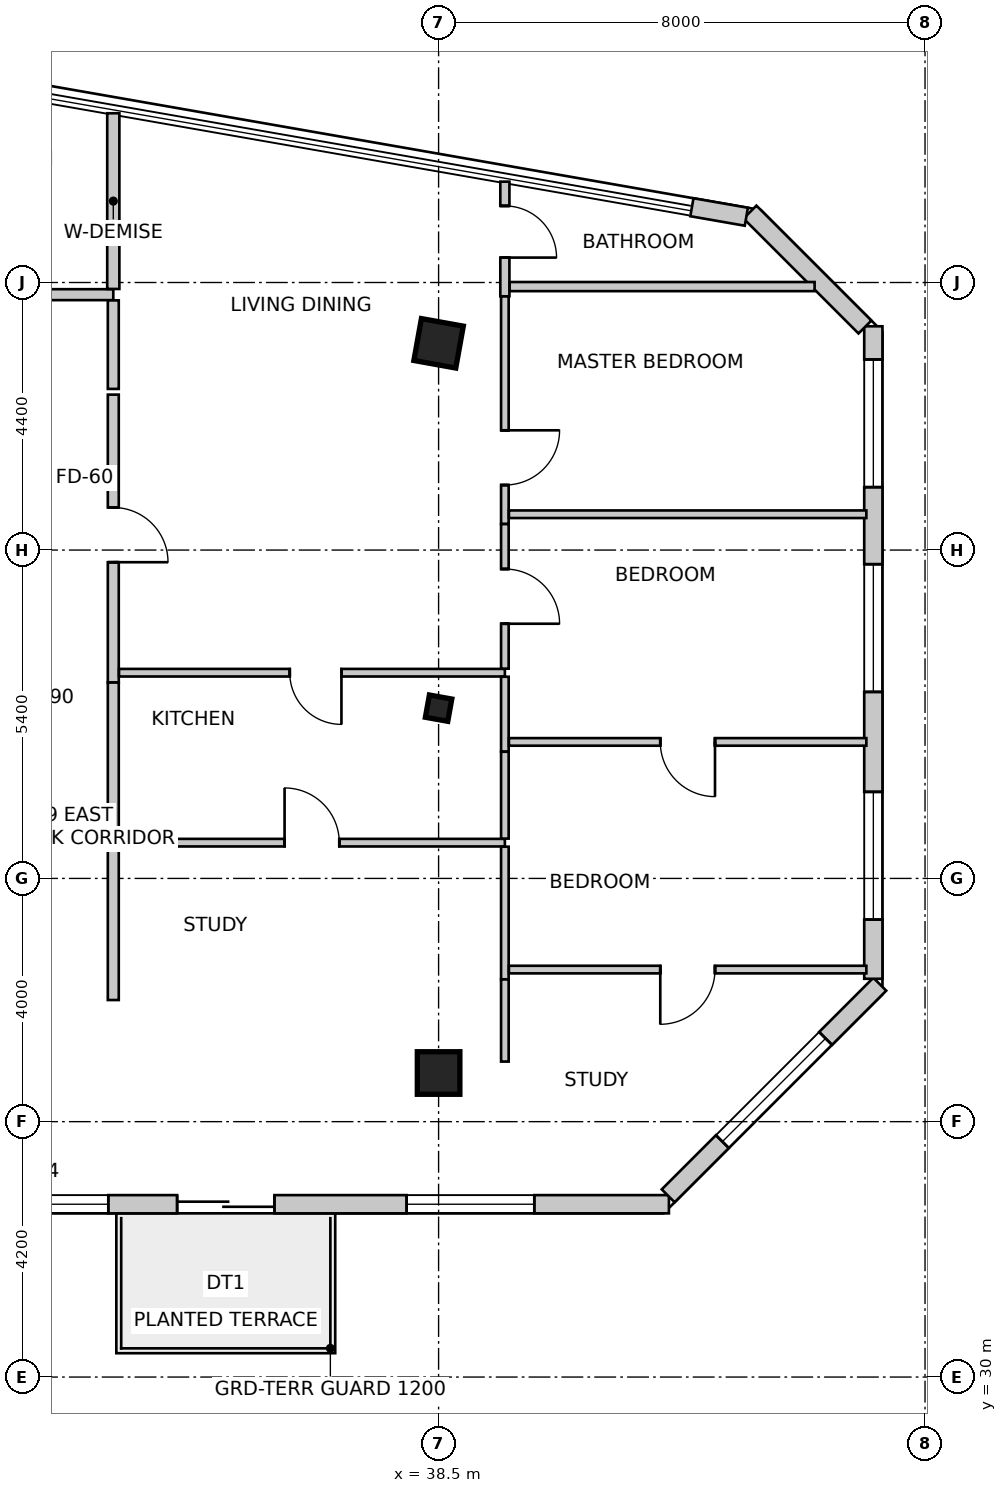
"""IFC4 building model, lengths in metres.
Left out: names, types, materials, properties, quantities, classifications, styles, units other than length and angle.
Written with IfcOpenShell. Run it as: python <this file> out.ifc"""

import sys

from ifc_helpers import new_model, si_unit, direction, frame, frame_2d, origin, origin_2d, place, context, subcontext, project, spatial, rectangle, i_section, extrude, source, transform, mapped, element, fill, save


model = new_model("IFC4")
c1 = context("Model", 3, precision=1e-05, world=origin(), true_north=direction((0.0, 1.0)))
c2 = subcontext(c1, "Body", "Model", "MODEL_VIEW")
j1 = project(units=[si_unit("LENGTHUNIT", "METRE"), si_unit("PLANEANGLEUNIT", "RADIAN")], contexts=[c1])
p1 = place(None, origin())
s1 = spatial("IfcSite", under=j1, at=p1, CompositionType="ELEMENT")
p2 = place(p1, origin())
s2 = spatial("IfcBuilding", under=s1, at=p2, CompositionType="ELEMENT")
p3 = place(p2, frame((0.0, 0.0, 232.4)))
s3 = spatial("IfcBuildingStorey", under=s2, at=p3, CompositionType="ELEMENT", Elevation=232.4)
m1 = source(origin(), c2, "Body", "SweptSolid", [
    extrude(rectangle(XDim=0.7, YDim=0.7, at=origin_2d()), origin(), (0.0, 0.0, 1.0), 3.5),
])
for number, where, z_axis, x_axis in (
    (1, (38.5, 47.0, 0.0), (0.0, 0.0, 1.0), (0.984, -0.177, 0.0)),
    (2, (38.5, 35.0, 0.0), (0.0, 0.0, 1.0), (1.0, 0.0, 0.0)),
):
    element("IfcColumn", number, at=place(p3, frame(where, z_axis=z_axis, x_axis=x_axis)), inside=s3, PredefinedType="COLUMN", context=c2, shape_type="MappedRepresentation", body=[
        mapped(m1, transform((0.0, 0.0, 0.0), scale=1.0)),
    ])
m2 = source(origin(), c2, "Body", "SweptSolid", [
    extrude(i_section(OverallWidth=0.374, OverallDepth=0.372, WebThickness=0.016, FlangeThickness=0.026, FilletRadius=0.015, at=origin_2d()), origin(), (0.0, 0.0, 1.0), 3.5),
])
p4 = place(p3, frame((38.5, 41.0, 0.0), z_axis=(0.0, 0.0, 1.0), x_axis=(0.984195607969, -0.17708474032, 0.0)))
e3 = element("IfcColumn", 3, at=p4, inside=s3, PredefinedType="COLUMN", context=c2, shape_type="MappedRepresentation", body=[
    mapped(m2, transform((0.0, 0.0, 0.0), scale=1.0)),
])
p5 = place(p3, frame((29.797, 32.842, 0.0), z_axis=(0.0, 0.0, 1.0), x_axis=(1.0, 0.0, 0.0)))
e4 = element("IfcWall", 4, at=p5, inside=s3, PredefinedType="SOLIDWALL", context=c2, shape_type="SweptSolid", body=[
    extrude(rectangle(XDim=12.491, YDim=0.3, at=frame_2d((6.245, 0.0))), origin(), (0.0, 0.0, 1.0), 3.25),
])
m3 = source(origin(), c2, "Body", "SweptSolid", [
    extrude(rectangle(XDim=1.6, YDim=2.15, at=frame_2d((0.8, 1.075))), frame((0.0, 0.16, 0.0), z_axis=(0.0, -1.0, 0.0), x_axis=(1.0, 0.0, 0.0)), (0.0, 0.0, 1.0), 0.32),
])
p6 = place(p5, frame((4.403, 0.0, 0.0)))
e5 = element("IfcOpeningElement", 5, at=p6, cuts=e4, PredefinedType="OPENING", context=c2, shape_type="MappedRepresentation", body=[
    mapped(m3, transform((0.0, 0.0, 0.0), scale=1.0)),
])
m4 = source(origin(), c2, "Body", "SweptSolid", [
    extrude(rectangle(XDim=2.1, YDim=2.0, at=frame_2d((1.05, 1.0))), frame((0.0, 0.16, 0.0), z_axis=(0.0, -1.0, 0.0), x_axis=(1.0, 0.0, 0.0)), (0.0, 0.0, 1.0), 0.32),
])
p7 = place(p5, frame((1.171, 0.0, 0.85)))
e6 = element("IfcOpeningElement", 6, at=p7, cuts=e4, PredefinedType="OPENING", context=c2, shape_type="MappedRepresentation", body=[
    mapped(m4, transform((0.0, 0.0, 0.0), scale=1.0)),
])
p8 = place(p5, frame((8.177, 0.0, 0.85)))
e7 = element("IfcOpeningElement", 7, at=p8, cuts=e4, PredefinedType="OPENING", context=c2, shape_type="MappedRepresentation", body=[
    mapped(m4, transform((0.0, 0.0, 0.0), scale=1.0)),
])
p9 = place(p3, frame((42.276, 32.98, 0.0), z_axis=(0.0, 0.0, 1.0), x_axis=(0.707106781187, 0.707106781187, 0.0)))
e8 = element("IfcWall", 8, at=p9, inside=s3, PredefinedType="SOLIDWALL", context=c2, shape_type="SweptSolid", body=[
    extrude(rectangle(XDim=4.922, YDim=0.3, at=frame_2d((2.461, 0.0))), origin(), (0.0, 0.0, 1.0), 3.25),
])
m5 = source(origin(), c2, "Body", "SweptSolid", [
    extrude(rectangle(XDim=2.4, YDim=2.2, at=frame_2d((1.2, 1.1))), frame((0.0, 0.16, 0.0), z_axis=(0.0, -1.0, 0.0), x_axis=(1.0, 0.0, 0.0)), (0.0, 0.0, 1.0), 0.32),
])
p10 = place(p9, frame((1.261, 0.0, 0.85)))
e9 = element("IfcOpeningElement", 9, at=p10, cuts=e8, PredefinedType="OPENING", context=c2, shape_type="MappedRepresentation", body=[
    mapped(m5, transform((0.0, 0.0, 0.0), scale=1.0)),
])
p11 = place(p3, frame((45.65, 36.549, 0.0), z_axis=(0.0, 0.0, 1.0), x_axis=(0.0, 1.0, 0.0)))
e10 = element("IfcWall", 10, at=p11, inside=s3, PredefinedType="SOLIDWALL", context=c2, shape_type="SweptSolid", body=[
    extrude(rectangle(XDim=10.73, YDim=0.3, at=frame_2d((5.365, 0.0))), origin(), (0.0, 0.0, 1.0), 3.25),
])
p12 = place(p11, frame((0.974, 0.0, 0.85)))
e11 = element("IfcOpeningElement", 11, at=p12, cuts=e10, PredefinedType="OPENING", context=c2, shape_type="MappedRepresentation", body=[
    mapped(m4, transform((0.0, 0.0, 0.0), scale=1.0)),
])
p13 = place(p11, frame((4.718, 0.0, 0.85)))
e12 = element("IfcOpeningElement", 12, at=p13, cuts=e10, PredefinedType="OPENING", context=c2, shape_type="MappedRepresentation", body=[
    mapped(m4, transform((0.0, 0.0, 0.0), scale=1.0)),
])
p14 = place(p11, frame((8.085, 0.0, 0.85)))
e13 = element("IfcOpeningElement", 13, at=p14, cuts=e10, PredefinedType="OPENING", context=c2, shape_type="MappedRepresentation", body=[
    mapped(m4, transform((0.0, 0.0, 0.0), scale=1.0)),
])
p15 = place(p3, frame((45.512, 47.268, 0.0), z_axis=(0.0, 0.0, 1.0), x_axis=(-0.707106781187, 0.707106781187, 0.0)))
e14 = element("IfcWall", 14, at=p15, inside=s3, PredefinedType="SOLIDWALL", context=c2, shape_type="SweptSolid", body=[
    extrude(rectangle(XDim=2.674, YDim=0.3, at=frame_2d((1.337, 0.0))), origin(), (0.0, 0.0, 1.0), 3.25),
])
p16 = place(p3, frame((43.561, 49.081, 0.0), z_axis=(0.0, 0.0, 1.0), x_axis=(-0.985063518612, 0.172191359539, 0.0)))
e15 = element("IfcWall", 15, at=p16, inside=s3, PredefinedType="SOLIDWALL", context=c2, shape_type="SweptSolid", body=[
    extrude(rectangle(XDim=0.909, YDim=0.3, at=frame_2d((0.455, 0.0))), origin(), (0.0, 0.0, 1.0), 3.25),
])
p17 = place(p3, frame((28.362, 47.8, 0.0), z_axis=(0.0, 0.0, 1.0), x_axis=(1.0, 0.0, 0.0)))
e16 = element("IfcWall", 16, at=p17, inside=s3, PredefinedType="PARTITIONING", context=c2, shape_type="SweptSolid", body=[
    extrude(rectangle(XDim=4.788, YDim=0.18, at=frame_2d((2.394, 0.0))), origin(), (0.0, 0.0, 1.0), 2.822),
])
m6 = source(origin(), c2, "Body", "SweptSolid", [
    extrude(rectangle(XDim=0.85, YDim=2.15, at=frame_2d((0.425, 1.075))), frame((0.0, 0.1, 0.0), z_axis=(0.0, -1.0, 0.0), x_axis=(1.0, 0.0, 0.0)), (0.0, 0.0, 1.0), 0.2),
])
p18 = place(p17, frame((0.401, 0.0, 0.0)))
e17 = element("IfcOpeningElement", 17, at=p18, cuts=e16, PredefinedType="OPENING", context=c2, shape_type="MappedRepresentation", body=[
    mapped(m6, transform((0.0, 0.0, 0.0), scale=1.0)),
])
p19 = place(p3, frame((33.15, 47.706, 0.0), z_axis=(0.0, 0.0, 1.0), x_axis=(0.0, -1.0, 0.0)))
e18 = element("IfcWall", 18, at=p19, inside=s3, PredefinedType="PARTITIONING", context=c2, shape_type="SweptSolid", body=[
    extrude(rectangle(XDim=1.456, YDim=0.18, at=frame_2d((0.728, 0.0))), origin(), (0.0, 0.0, 1.0), 2.934),
])
p20 = place(p3, frame((33.15, 38.948, 0.0), z_axis=(0.0, 0.0, 1.0), x_axis=(0.0, -1.0, 0.0)))
e19 = element("IfcWall", 19, at=p20, inside=s3, PredefinedType="PARTITIONING", context=c2, shape_type="SweptSolid", body=[
    extrude(rectangle(XDim=2.748, YDim=0.18, at=frame_2d((1.374, 0.0))), origin(), (0.0, 0.0, 1.0), 3.25),
])
p21 = place(p3, frame((33.15, 46.156, 0.0), z_axis=(0.0, 0.0, 1.0), x_axis=(0.0, -1.0, 0.0)))
e20 = element("IfcWall", 20, at=p21, inside=s3, PredefinedType="PARTITIONING", context=c2, shape_type="SweptSolid", body=[
    extrude(rectangle(XDim=4.733, YDim=0.18, at=frame_2d((2.366, 0.0))), origin(), (0.0, 0.0, 1.0), 2.822),
])
m7 = source(origin(), c2, "Body", "SweptSolid", [
    extrude(rectangle(XDim=0.9, YDim=2.15, at=frame_2d((0.45, 1.075))), frame((0.0, 0.1, 0.0), z_axis=(0.0, -1.0, 0.0), x_axis=(1.0, 0.0, 0.0)), (0.0, 0.0, 1.0), 0.2),
])
p22 = place(p21, frame((1.856, 0.0, 0.0)))
e21 = element("IfcOpeningElement", 21, at=p22, cuts=e20, PredefinedType="OPENING", context=c2, shape_type="MappedRepresentation", body=[
    mapped(m7, transform((0.0, 0.0, 0.0), scale=1.0)),
])
p23 = place(p3, frame((33.15, 41.421, 0.0), z_axis=(0.0, 0.0, 1.0), x_axis=(0.0, -1.0, 0.0)))
e22 = element("IfcWall", 22, at=p23, inside=s3, PredefinedType="PARTITIONING", context=c2, shape_type="SweptSolid", body=[
    extrude(rectangle(XDim=2.471, YDim=0.18, at=frame_2d((1.235, 0.0))), origin(), (0.0, 0.0, 1.0), 3.25),
])
p24 = place(p3, frame((33.15, 50.783, 0.0), z_axis=(0.0, 0.0, 1.0), x_axis=(0.0, -1.0, 0.0)))
e23 = element("IfcWall", 23, at=p24, inside=s3, PredefinedType="PARTITIONING", context=c2, shape_type="SweptSolid", body=[
    extrude(rectangle(XDim=2.889, YDim=0.2, at=frame_2d((1.445, 0.0))), origin(), (0.0, 0.0, 1.0), 2.542),
])
p25 = place(p3, frame((33.244, 38.788, 0.0), z_axis=(0.0, 0.0, 1.0), x_axis=(1.0, 0.0, 0.0)))
e24 = element("IfcWall", 24, at=p25, inside=s3, PredefinedType="PARTITIONING", context=c2, shape_type="SweptSolid", body=[
    extrude(rectangle(XDim=6.346, YDim=0.125, at=frame_2d((3.173, 0.0))), origin(), (0.0, 0.0, 1.0), 2.766),
])
m8 = source(origin(), c2, "Body", "SweptSolid", [
    extrude(rectangle(XDim=0.9, YDim=2.15, at=frame_2d((0.45, 1.075))), frame((0.0, 0.073, 0.0), z_axis=(0.0, -1.0, 0.0), x_axis=(1.0, 0.0, 0.0)), (0.0, 0.0, 1.0), 0.145),
])
p26 = place(p25, frame((2.723, 0.0, 0.0)))
e25 = element("IfcOpeningElement", 25, at=p26, cuts=e24, PredefinedType="OPENING", context=c2, shape_type="MappedRepresentation", body=[
    mapped(m8, transform((0.0, 0.0, 0.0), scale=1.0)),
])
p27 = place(p3, frame((39.59, 38.721, 0.0), z_axis=(0.0, 0.0, 1.0), x_axis=(0.0, -1.0, 0.0)))
e26 = element("IfcWall", 26, at=p27, inside=s3, PredefinedType="PARTITIONING", context=c2, shape_type="SweptSolid", body=[
    extrude(rectangle(XDim=2.18, YDim=0.125, at=frame_2d((1.09, 0.0))), origin(), (0.0, 0.0, 1.0), 3.25),
])
p28 = place(p3, frame((39.59, 36.539, 0.0), z_axis=(0.0, 0.0, 1.0), x_axis=(0.0, -1.0, 0.0)))
e27 = element("IfcWall", 27, at=p28, inside=s3, PredefinedType="PARTITIONING", context=c2, shape_type="SweptSolid", body=[
    extrude(rectangle(XDim=1.351, YDim=0.125, at=frame_2d((0.676, 0.0))), origin(), (0.0, 0.0, 1.0), 3.25),
])
p29 = place(p3, frame((39.59, 41.583, 0.0), z_axis=(0.0, 0.0, 1.0), x_axis=(-1.0, 0.0, 0.0)))
e28 = element("IfcWall", 28, at=p29, inside=s3, PredefinedType="PARTITIONING", context=c2, shape_type="SweptSolid", body=[
    extrude(rectangle(XDim=6.346, YDim=0.125, at=frame_2d((3.173, 0.0))), origin(), (0.0, 0.0, 1.0), 2.766),
])
m9 = source(origin(), c2, "Body", "SweptSolid", [
    extrude(rectangle(XDim=0.85, YDim=2.15, at=frame_2d((0.425, 1.075))), frame((0.0, 0.073, 0.0), z_axis=(0.0, -1.0, 0.0), x_axis=(1.0, 0.0, 0.0)), (0.0, 0.0, 1.0), 0.145),
])
p30 = place(p29, frame((2.688, 0.0, 0.0)))
e29 = element("IfcOpeningElement", 29, at=p30, cuts=e28, PredefinedType="OPENING", context=c2, shape_type="MappedRepresentation", body=[
    mapped(m9, transform((0.0, 0.0, 0.0), scale=1.0)),
])
p31 = place(p3, frame((39.59, 49.658, 0.0), z_axis=(0.0, 0.0, 1.0), x_axis=(0.0, -1.0, 0.0)))
e30 = element("IfcWall", 30, at=p31, inside=s3, PredefinedType="PARTITIONING", context=c2, shape_type="SweptSolid", body=[
    extrude(rectangle(XDim=1.885, YDim=0.15, at=frame_2d((0.943, 0.0))), origin(), (0.0, 0.0, 1.0), 3.25),
])
m10 = source(origin(), c2, "Body", "SweptSolid", [
    extrude(rectangle(XDim=0.85, YDim=2.15, at=frame_2d((0.425, 1.075))), frame((0.0, 0.085, 0.0), z_axis=(0.0, -1.0, 0.0), x_axis=(1.0, 0.0, 0.0)), (0.0, 0.0, 1.0), 0.17),
])
p32 = place(p31, frame((0.399, 0.0, 0.0)))
e31 = element("IfcOpeningElement", 31, at=p32, cuts=e30, PredefinedType="OPENING", context=c2, shape_type="MappedRepresentation", body=[
    mapped(m10, transform((0.0, 0.0, 0.0), scale=1.0)),
])
p33 = place(p3, frame((39.59, 47.771, 0.0), z_axis=(0.0, 0.0, 1.0), x_axis=(0.0, -1.0, 0.0)))
e32 = element("IfcWall", 32, at=p33, inside=s3, PredefinedType="PARTITIONING", context=c2, shape_type="SweptSolid", body=[
    extrude(rectangle(XDim=3.742, YDim=0.125, at=frame_2d((1.871, 0.0))), origin(), (0.0, 0.0, 1.0), 3.25),
])
p34 = place(p33, frame((2.202, 0.0, 0.0)))
e33 = element("IfcOpeningElement", 33, at=p34, cuts=e32, PredefinedType="OPENING", context=c2, shape_type="MappedRepresentation", body=[
    mapped(m8, transform((0.0, 0.0, 0.0), scale=1.0)),
])
p35 = place(p3, frame((39.59, 44.027, 0.0), z_axis=(0.0, 0.0, 1.0), x_axis=(0.0, -1.0, 0.0)))
e34 = element("IfcWall", 34, at=p35, inside=s3, PredefinedType="PARTITIONING", context=c2, shape_type="SweptSolid", body=[
    extrude(rectangle(XDim=2.378, YDim=0.125, at=frame_2d((1.189, 0.0))), origin(), (0.0, 0.0, 1.0), 3.25),
])
p36 = place(p35, frame((0.739, 0.0, 0.0)))
e35 = element("IfcOpeningElement", 35, at=p36, cuts=e34, PredefinedType="OPENING", context=c2, shape_type="MappedRepresentation", body=[
    mapped(m8, transform((0.0, 0.0, 0.0), scale=1.0)),
])
p37 = place(p3, frame((39.59, 41.517, 0.0), z_axis=(0.0, 0.0, 1.0), x_axis=(0.0, -1.0, 0.0)))
e36 = element("IfcWall", 36, at=p37, inside=s3, PredefinedType="PARTITIONING", context=c2, shape_type="SweptSolid", body=[
    extrude(rectangle(XDim=1.232, YDim=0.125, at=frame_2d((0.616, 0.0))), origin(), (0.0, 0.0, 1.0), 3.25),
])
p38 = place(p3, frame((39.59, 40.283, 0.0), z_axis=(0.0, 0.0, 1.0), x_axis=(0.0, -1.0, 0.0)))
e37 = element("IfcWall", 37, at=p38, inside=s3, PredefinedType="PARTITIONING", context=c2, shape_type="SweptSolid", body=[
    extrude(rectangle(XDim=1.428, YDim=0.125, at=frame_2d((0.714, 0.0))), origin(), (0.0, 0.0, 1.0), 3.25),
])
p39 = place(p3, frame((44.684, 47.933, 0.0), z_axis=(0.0, 0.0, 1.0), x_axis=(-1.0, 0.0, 0.0)))
e38 = element("IfcWall", 38, at=p39, inside=s3, PredefinedType="PARTITIONING", context=c2, shape_type="SweptSolid", body=[
    extrude(rectangle(XDim=5.015, YDim=0.15, at=frame_2d((2.508, 0.0))), origin(), (0.0, 0.0, 1.0), 3.25),
])
p40 = place(p3, frame((45.535, 44.189, 0.0), z_axis=(0.0, 0.0, 1.0), x_axis=(-1.0, 0.0, 0.0)))
e39 = element("IfcWall", 39, at=p40, inside=s3, PredefinedType="PARTITIONING", context=c2, shape_type="SweptSolid", body=[
    extrude(rectangle(XDim=5.878, YDim=0.125, at=frame_2d((2.939, 0.0))), origin(), (0.0, 0.0, 1.0), 3.25),
])
p41 = place(p3, frame((45.535, 40.445, 0.0), z_axis=(0.0, 0.0, 1.0), x_axis=(-1.0, 0.0, 0.0)))
e40 = element("IfcWall", 40, at=p41, inside=s3, PredefinedType="PARTITIONING", context=c2, shape_type="SweptSolid", body=[
    extrude(rectangle(XDim=5.878, YDim=0.125, at=frame_2d((2.939, 0.0))), origin(), (0.0, 0.0, 1.0), 3.25),
])
p42 = place(p41, frame((2.489, 0.0, 0.0)))
e41 = element("IfcOpeningElement", 41, at=p42, cuts=e40, PredefinedType="OPENING", context=c2, shape_type="MappedRepresentation", body=[
    mapped(m8, transform((0.0, 0.0, 0.0), scale=1.0)),
])
p43 = place(p3, frame((45.535, 36.701, 0.0), z_axis=(0.0, 0.0, 1.0), x_axis=(-1.0, 0.0, 0.0)))
e42 = element("IfcWall", 42, at=p43, inside=s3, PredefinedType="PARTITIONING", context=c2, shape_type="SweptSolid", body=[
    extrude(rectangle(XDim=5.878, YDim=0.125, at=frame_2d((2.939, 0.0))), origin(), (0.0, 0.0, 1.0), 3.25),
])
p44 = place(p43, frame((2.489, 0.0, 0.0)))
e43 = element("IfcOpeningElement", 43, at=p44, cuts=e42, PredefinedType="OPENING", context=c2, shape_type="MappedRepresentation", body=[
    mapped(m8, transform((0.0, 0.0, 0.0), scale=1.0)),
])
m11 = source(origin(), c2, "Body", "SweptSolid", [
    extrude(rectangle(XDim=1.6, YDim=2.15, at=frame_2d((0.8, 1.075))), frame((0.0, 0.025, 0.0), z_axis=(0.0, -1.0, 0.0), x_axis=(1.0, 0.0, 0.0)), (0.0, 0.0, 1.0), 0.05),
])
p45 = place(p6, origin())
e44 = element("IfcDoor", 44, at=p45, inside=s3, OperationType="DOUBLE_DOOR_SLIDING", PredefinedType="DOOR", context=c2, shape_type="MappedRepresentation", body=[
    mapped(m11, transform((0.0, 0.0, 0.0), scale=1.0)),
])
fill(e5, e44)
m12 = source(origin(), c2, "Body", "SweptSolid", [
    extrude(rectangle(XDim=2.1, YDim=2.0, at=frame_2d((1.05, 1.0))), frame((0.0, -0.015, 0.0), z_axis=(0.0, -1.0, 0.0), x_axis=(1.0, 0.0, 0.0)), (0.0, 0.0, 1.0), 0.06),
])
p46 = place(p7, origin())
e45 = element("IfcWindow", 45, at=p46, inside=s3, PartitioningType="SINGLE_PANEL", PredefinedType="WINDOW", context=c2, shape_type="MappedRepresentation", body=[
    mapped(m12, transform((0.0, 0.0, 0.0), scale=1.0)),
])
fill(e6, e45)
p47 = place(p8, origin())
e46 = element("IfcWindow", 46, at=p47, inside=s3, PartitioningType="SINGLE_PANEL", PredefinedType="WINDOW", context=c2, shape_type="MappedRepresentation", body=[
    mapped(m12, transform((0.0, 0.0, 0.0), scale=1.0)),
])
fill(e7, e46)
m13 = source(origin(), c2, "Body", "SweptSolid", [
    extrude(rectangle(XDim=2.4, YDim=2.2, at=frame_2d((1.2, 1.1))), frame((0.0, -0.015, 0.0), z_axis=(0.0, -1.0, 0.0), x_axis=(1.0, 0.0, 0.0)), (0.0, 0.0, 1.0), 0.06),
])
p48 = place(p10, origin())
e47 = element("IfcWindow", 47, at=p48, inside=s3, PartitioningType="SINGLE_PANEL", PredefinedType="WINDOW", context=c2, shape_type="MappedRepresentation", body=[
    mapped(m13, transform((0.0, 0.0, 0.0), scale=1.0)),
])
fill(e9, e47)
p49 = place(p12, origin())
e48 = element("IfcWindow", 48, at=p49, inside=s3, PartitioningType="SINGLE_PANEL", PredefinedType="WINDOW", context=c2, shape_type="MappedRepresentation", body=[
    mapped(m12, transform((0.0, 0.0, 0.0), scale=1.0)),
])
fill(e11, e48)
p50 = place(p13, origin())
e49 = element("IfcWindow", 49, at=p50, inside=s3, PartitioningType="SINGLE_PANEL", PredefinedType="WINDOW", context=c2, shape_type="MappedRepresentation", body=[
    mapped(m12, transform((0.0, 0.0, 0.0), scale=1.0)),
])
fill(e12, e49)
p51 = place(p14, origin())
e50 = element("IfcWindow", 50, at=p51, inside=s3, PartitioningType="SINGLE_PANEL", PredefinedType="WINDOW", context=c2, shape_type="MappedRepresentation", body=[
    mapped(m12, transform((0.0, 0.0, 0.0), scale=1.0)),
])
fill(e13, e50)
m14 = source(origin(), c2, "Body", "SweptSolid", [
    extrude(rectangle(XDim=0.9, YDim=2.15, at=frame_2d((0.45, 1.075))), frame((0.0, 0.025, 0.0), z_axis=(0.0, -1.0, 0.0), x_axis=(1.0, 0.0, 0.0)), (0.0, 0.0, 1.0), 0.05),
])
p52 = place(p26, origin())
e51 = element("IfcDoor", 51, at=p52, inside=s3, OperationType="SINGLE_SWING_LEFT", PredefinedType="DOOR", context=c2, shape_type="MappedRepresentation", body=[
    mapped(m14, transform((0.0, 0.0, 0.0), scale=1.0)),
])
fill(e25, e51)
m15 = source(origin(), c2, "Body", "SweptSolid", [
    extrude(rectangle(XDim=0.9, YDim=2.15, at=frame_2d((0.45, 1.075))), frame((0.0, 0.025, 0.0), z_axis=(0.0, -1.0, 0.0), x_axis=(1.0, 0.0, 0.0)), (0.0, 0.0, 1.0), 0.05),
])
p53 = place(p22, origin())
e52 = element("IfcDoor", 52, at=p53, inside=s3, OperationType="SINGLE_SWING_RIGHT", PredefinedType="DOOR", context=c2, shape_type="MappedRepresentation", body=[
    mapped(m15, transform((0.0, 0.0, 0.0), scale=1.0)),
])
fill(e21, e52)
m16 = source(origin(), c2, "Body", "SweptSolid", [
    extrude(rectangle(XDim=0.85, YDim=2.15, at=frame_2d((0.425, 1.075))), frame((0.0, 0.025, 0.0), z_axis=(0.0, -1.0, 0.0), x_axis=(1.0, 0.0, 0.0)), (0.0, 0.0, 1.0), 0.05),
])
p54 = place(p30, origin())
e53 = element("IfcDoor", 53, at=p54, inside=s3, OperationType="SINGLE_SWING_LEFT", PredefinedType="DOOR", context=c2, shape_type="MappedRepresentation", body=[
    mapped(m16, transform((0.0, 0.0, 0.0), scale=1.0)),
])
fill(e29, e53)
p55 = place(p32, origin())
e54 = element("IfcDoor", 54, at=p55, inside=s3, OperationType="SINGLE_SWING_RIGHT", PredefinedType="DOOR", context=c2, shape_type="MappedRepresentation", body=[
    mapped(m16, transform((0.0, 0.0, 0.0), scale=1.0)),
])
fill(e31, e54)
p56 = place(p34, origin())
e55 = element("IfcDoor", 55, at=p56, inside=s3, OperationType="SINGLE_SWING_LEFT", PredefinedType="DOOR", context=c2, shape_type="MappedRepresentation", body=[
    mapped(m14, transform((0.0, 0.0, 0.0), scale=1.0)),
])
fill(e33, e55)
p57 = place(p36, origin())
e56 = element("IfcDoor", 56, at=p57, inside=s3, OperationType="SINGLE_SWING_RIGHT", PredefinedType="DOOR", context=c2, shape_type="MappedRepresentation", body=[
    mapped(m14, transform((0.0, 0.0, 0.0), scale=1.0)),
])
fill(e35, e56)
p58 = place(p42, origin())
e57 = element("IfcDoor", 57, at=p58, inside=s3, OperationType="SINGLE_SWING_LEFT", PredefinedType="DOOR", context=c2, shape_type="MappedRepresentation", body=[
    mapped(m14, transform((0.0, 0.0, 0.0), scale=1.0)),
])
fill(e41, e57)
p59 = place(p44, origin())
e58 = element("IfcDoor", 58, at=p59, inside=s3, OperationType="SINGLE_SWING_RIGHT", PredefinedType="DOOR", context=c2, shape_type="MappedRepresentation", body=[
    mapped(m14, transform((0.0, 0.0, 0.0), scale=1.0)),
])
fill(e43, e58)
save(model, sys.argv[1])
